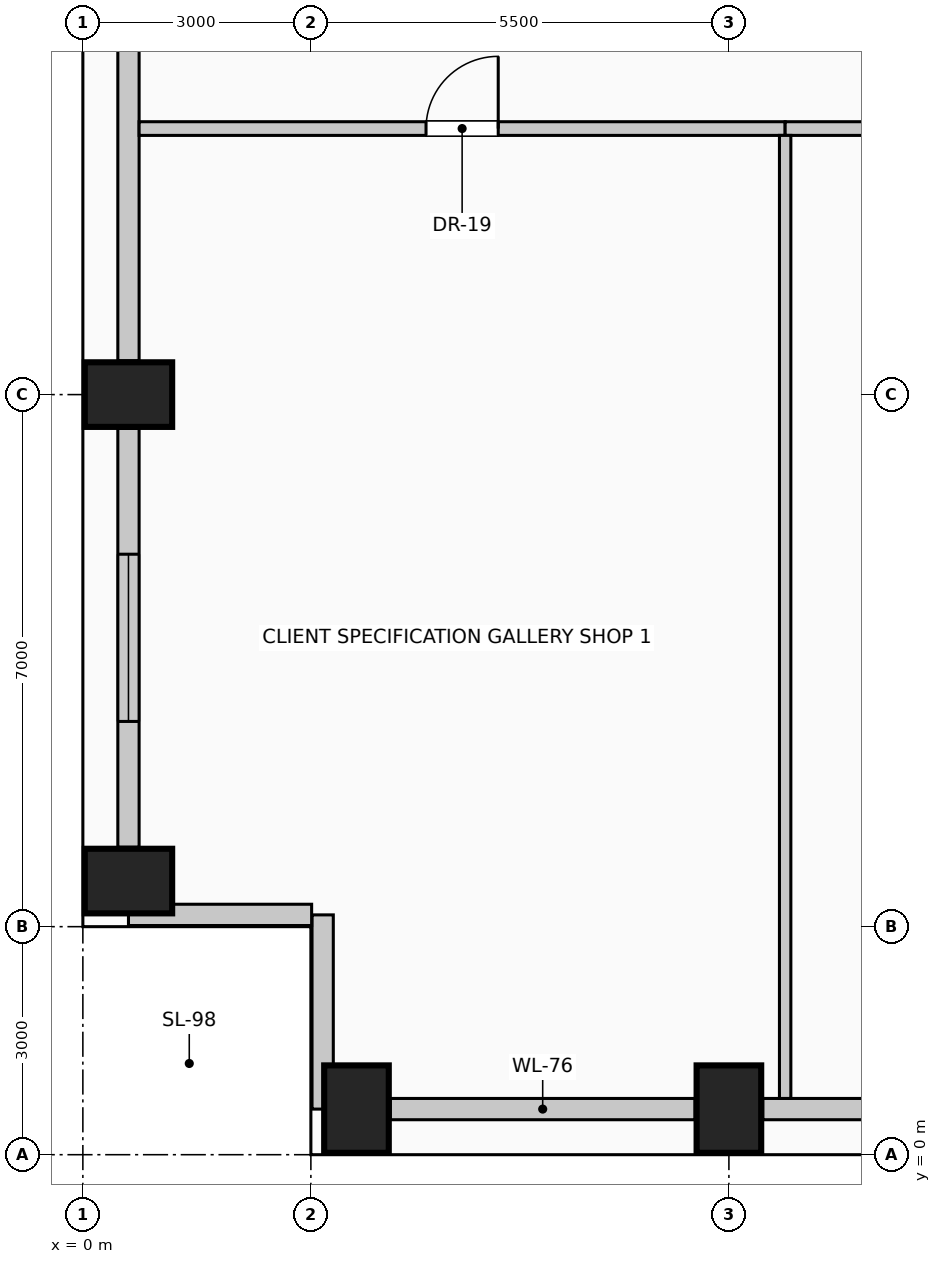
"""IFC4 building model, lengths in metres.
Left out: names, types, materials, properties, quantities, classifications, styles, units other than length and angle.
Written with IfcOpenShell. Run it as: python <this file> out.ifc"""

import sys

from ifc_helpers import new_model, si_unit, direction, frame, frame_2d, origin, origin_2d, place, context, subcontext, project, spatial, rectangle, extrude, element, fill, save


model = new_model("IFC4")
c1 = context("Model", 3, precision=1e-05, world=origin(), true_north=direction((0.0, 1.0)))
c2 = subcontext(c1, "Body", "Model", "MODEL_VIEW")
j1 = project(units=[si_unit("LENGTHUNIT", "METRE"), si_unit("PLANEANGLEUNIT", "RADIAN")], contexts=[c1])
p1 = place(None, origin())
s1 = spatial("IfcSite", under=j1, at=p1, CompositionType="ELEMENT")
p2 = place(p1, origin())
s2 = spatial("IfcBuilding", under=s1, at=p2, CompositionType="ELEMENT")
p3 = place(p2, frame((0.0, 0.0, 132.6)))
s3 = spatial("IfcBuildingStorey", under=s2, at=p3, CompositionType="ELEMENT", Elevation=132.6)
for number, where, z_axis, x_axis in (
    (1, (3.6, 0.6, 0.0), (0.0, 0.0, 1.0), (1.0, 0.0, 0.0)),
    (2, (8.5, 0.6, 0.0), (0.0, 0.0, 1.0), (1.0, 0.0, 0.0)),
    (3, (0.6, 3.6, 0.0), (0.0, 0.0, 1.0), (0.0, 1.0, 0.0)),
    (4, (0.6, 10.0, 0.0), (0.0, 0.0, 1.0), (0.0, 1.0, 0.0)),
):
    element("IfcColumn", number, at=place(p3, frame(where, z_axis=z_axis, x_axis=x_axis)), inside=s3, PredefinedType="COLUMN", context=c2, shape_type="SweptSolid", body=[
        extrude(rectangle(XDim=0.85, YDim=1.15, at=origin_2d()), origin(), (0.0, 0.0, 1.0), 4.0),
    ])
p4 = place(p3, frame((8.055, 0.6, 0.0), z_axis=(0.0, 0.0, 1.0), x_axis=(-1.0, 0.0, 0.0)))
e5 = element("IfcWall", 5, at=p4, inside=s3, PredefinedType="SOLIDWALL", context=c2, shape_type="SweptSolid", body=[
    extrude(rectangle(XDim=4.01, YDim=0.28, at=frame_2d((2.005, 0.0))), origin(), (0.0, 0.0, 1.0), 2.875),
])
p5 = place(p3, frame((13.555, 0.6, 0.0), z_axis=(0.0, 0.0, 1.0), x_axis=(-1.0, 0.0, 0.0)))
e6 = element("IfcWall", 6, at=p5, inside=s3, PredefinedType="SOLIDWALL", context=c2, shape_type="SweptSolid", body=[
    extrude(rectangle(XDim=4.61, YDim=0.28, at=frame_2d((2.305, 0.0))), origin(), (0.0, 0.0, 1.0), 2.875),
])
p6 = place(p3, frame((0.6, 4.045, 0.0), z_axis=(0.0, 0.0, 1.0), x_axis=(0.0, 1.0, 0.0)))
e7 = element("IfcWall", 7, at=p6, inside=s3, PredefinedType="SOLIDWALL", context=c2, shape_type="SweptSolid", body=[
    extrude(rectangle(XDim=5.51, YDim=0.28, at=frame_2d((2.755, 0.0))), origin(), (0.0, 0.0, 1.0), 2.875),
])
p7 = place(p6, frame((1.655, 0.0, 0.5)))
e8 = element("IfcOpeningElement", 8, at=p7, cuts=e7, PredefinedType="OPENING", context=c2, shape_type="SweptSolid", body=[
    extrude(rectangle(XDim=2.2, YDim=1.95, at=frame_2d((1.1, 0.975))), frame((0.0, 0.15, 0.0), z_axis=(0.0, -1.0, 0.0), x_axis=(1.0, 0.0, 0.0)), (0.0, 0.0, 1.0), 0.3),
])
p8 = place(p3, frame((0.6, 10.445, 0.0), z_axis=(0.0, 0.0, 1.0), x_axis=(0.0, 1.0, 0.0)))
e9 = element("IfcWall", 9, at=p8, inside=s3, PredefinedType="SOLIDWALL", context=c2, shape_type="SweptSolid", body=[
    extrude(rectangle(XDim=7.11, YDim=0.28, at=frame_2d((3.555, 0.0))), origin(), (0.0, 0.0, 1.0), 2.875),
])
p9 = place(p3, frame((3.155, 0.6, 0.0), z_axis=(0.0, 0.0, 1.0), x_axis=(0.0, 1.0, 0.0)))
e10 = element("IfcWall", 10, at=p9, inside=s3, PredefinedType="SOLIDWALL", context=c2, shape_type="SweptSolid", body=[
    extrude(rectangle(XDim=2.555, YDim=0.28, at=frame_2d((1.277, 0.0))), origin(), (0.0, 0.0, 1.0), 3.725),
])
p10 = place(p3, frame((3.01, 3.155, 0.0), z_axis=(0.0, 0.0, 1.0), x_axis=(-1.0, 0.0, 0.0)))
e11 = element("IfcWall", 11, at=p10, inside=s3, PredefinedType="SOLIDWALL", context=c2, shape_type="SweptSolid", body=[
    extrude(rectangle(XDim=2.41, YDim=0.28, at=frame_2d((1.205, 0.0))), origin(), (0.0, 0.0, 1.0), 3.725),
])
p11 = place(p3, frame((0.74, 13.5, 0.0), z_axis=(0.0, 0.0, 1.0), x_axis=(1.0, 0.0, 0.0)))
e12 = element("IfcWall", 12, at=p11, inside=s3, PredefinedType="PARTITIONING", context=c2, shape_type="SweptSolid", body=[
    extrude(rectangle(XDim=8.5, YDim=0.18, at=frame_2d((4.25, 0.0))), origin(), (0.0, 0.0, 1.0), 3.725),
])
p12 = place(p11, frame((3.775, 0.0, 0.0)))
e13 = element("IfcOpeningElement", 13, at=p12, cuts=e12, PredefinedType="OPENING", context=c2, shape_type="SweptSolid", body=[
    extrude(rectangle(XDim=0.95, YDim=2.15, at=frame_2d((0.475, 1.075))), frame((0.0, 0.1, 0.0), z_axis=(0.0, -1.0, 0.0), x_axis=(1.0, 0.0, 0.0)), (0.0, 0.0, 1.0), 0.2),
])
p13 = place(p3, frame((9.24, 13.5, 0.0), z_axis=(0.0, 0.0, 1.0), x_axis=(1.0, 0.0, 0.0)))
e14 = element("IfcWall", 14, at=p13, inside=s3, PredefinedType="PARTITIONING", context=c2, shape_type="SweptSolid", body=[
    extrude(rectangle(XDim=7.16, YDim=0.18, at=frame_2d((3.58, 0.0))), origin(), (0.0, 0.0, 1.0), 3.725),
])
p14 = place(p13, frame((3.055, 0.0, 0.0)))
e15 = element("IfcOpeningElement", 15, at=p14, cuts=e14, PredefinedType="OPENING", context=c2, shape_type="SweptSolid", body=[
    extrude(rectangle(XDim=1.05, YDim=2.15, at=frame_2d((0.525, 1.075))), frame((0.0, 0.1, 0.0), z_axis=(0.0, -1.0, 0.0), x_axis=(1.0, 0.0, 0.0)), (0.0, 0.0, 1.0), 0.2),
])
p15 = place(p3, frame((9.24, 0.74, 0.0), z_axis=(0.0, 0.0, 1.0), x_axis=(0.0, 1.0, 0.0)))
e16 = element("IfcWall", 16, at=p15, inside=s3, PredefinedType="PARTITIONING", context=c2, shape_type="SweptSolid", body=[
    extrude(rectangle(XDim=12.67, YDim=0.15, at=frame_2d((6.335, 0.0))), origin(), (0.0, 0.0, 1.0), 3.725),
])
p16 = place(p7, origin())
e17 = element("IfcWindow", 17, at=p16, inside=s3, PartitioningType="SINGLE_PANEL", PredefinedType="WINDOW", context=c2, shape_type="SweptSolid", body=[
    extrude(rectangle(XDim=2.2, YDim=1.95, at=frame_2d((1.1, 0.975))), frame((0.0, 0.03, 0.0), z_axis=(0.0, -1.0, 0.0), x_axis=(1.0, 0.0, 0.0)), (0.0, 0.0, 1.0), 0.06),
])
fill(e8, e17)
p17 = place(p12, origin())
e18 = element("IfcDoor", 18, at=p17, inside=s3, OperationType="SINGLE_SWING_RIGHT", PredefinedType="DOOR", context=c2, shape_type="SweptSolid", body=[
    extrude(rectangle(XDim=0.95, YDim=2.15, at=frame_2d((0.475, 1.075))), frame((0.0, 0.025, 0.0), z_axis=(0.0, -1.0, 0.0), x_axis=(1.0, 0.0, 0.0)), (0.0, 0.0, 1.0), 0.05),
])
fill(e13, e18)
save(model, sys.argv[1])
